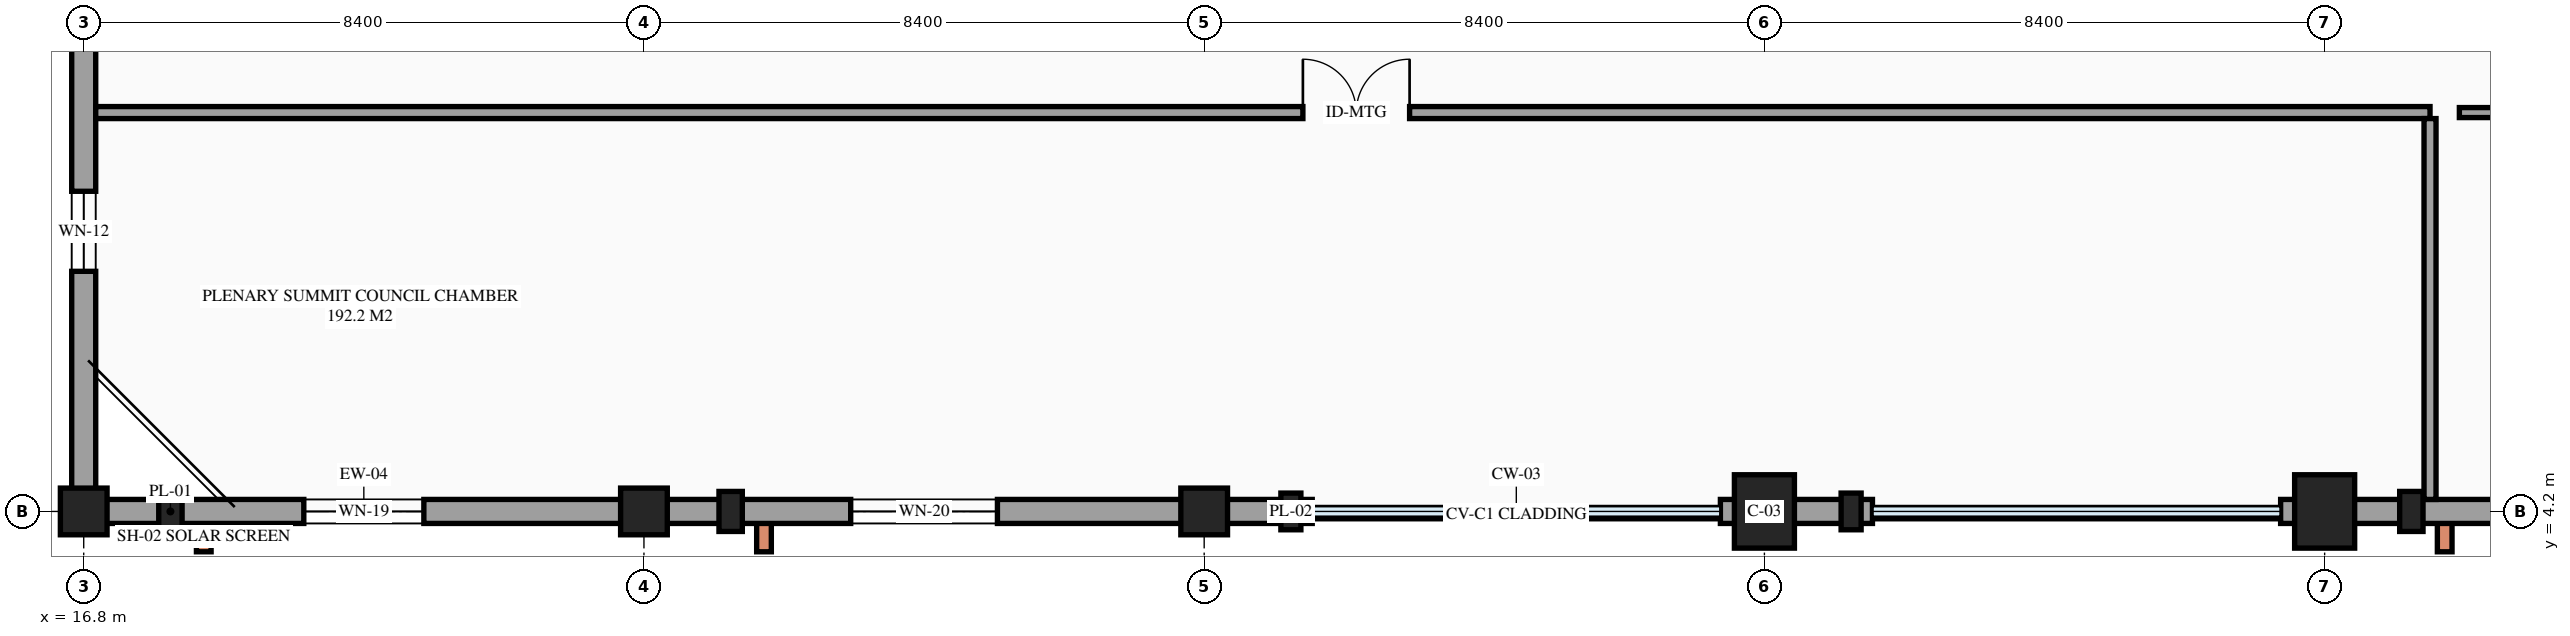
"""IFC4 building model, lengths in metres.
Left out: names, types, materials, properties, quantities, classifications, styles, units other than length and angle.
Written with IfcOpenShell. Run it as: python <this file> out.ifc"""

import sys

from ifc_helpers import new_model, si_unit, direction, frame, frame_2d, origin, origin_2d, place, context, subcontext, project, spatial, rectangle, extrude, element, fill, save


model = new_model("IFC4")
c1 = context("Model", 3, precision=1e-05, world=origin(), true_north=direction((0.0, 1.0)))
c2 = subcontext(c1, "Body", "Model", "MODEL_VIEW")
j1 = project(units=[si_unit("LENGTHUNIT", "METRE"), si_unit("PLANEANGLEUNIT", "RADIAN")], contexts=[c1])
p1 = place(None, origin())
s1 = spatial("IfcSite", under=j1, at=p1, CompositionType="ELEMENT")
p2 = place(p1, origin())
s2 = spatial("IfcBuilding", under=s1, at=p2, CompositionType="ELEMENT")
p3 = place(p2, frame((0.0, 0.0, 14.1)))
s3 = spatial("IfcBuildingStorey", under=s2, at=p3, CompositionType="ELEMENT", Elevation=14.1)
for number, where, z_axis, x_axis in (
    (1, (16.8, 4.2, 0.0), (0.0, 0.0, 1.0), (1.0, 0.0, 0.0)),
    (2, (25.2, 4.2, 0.0), (0.0, 0.0, 1.0), (1.0, 0.0, 0.0)),
    (3, (33.6, 4.2, 0.0), (0.0, 0.0, 1.0), (1.0, 0.0, 0.0)),
):
    element("IfcColumn", number, at=place(p3, frame(where, z_axis=z_axis, x_axis=x_axis)), inside=s3, PredefinedType="COLUMN", context=c2, shape_type="SweptSolid", body=[
        extrude(rectangle(XDim=0.7, YDim=0.7, at=origin_2d()), origin(), (0.0, 0.0, 1.0), 4.2),
    ])
for number, where, z_axis, x_axis in (
    (4, (42.0, 4.2, 0.0), (0.0, 0.0, 1.0), (1.0, 0.0, 0.0)),
    (5, (50.4, 4.2, 0.0), (0.0, 0.0, 1.0), (1.0, 0.0, 0.0)),
):
    element("IfcColumn", number, at=place(p3, frame(where, z_axis=z_axis, x_axis=x_axis)), inside=s3, PredefinedType="COLUMN", context=c2, shape_type="SweptSolid", body=[
        extrude(rectangle(XDim=0.9, YDim=1.1, at=origin_2d()), origin(), (0.0, 0.0, 1.0), 4.2),
    ])
for number, where, z_axis, x_axis in (
    (6, (18.1, 4.2, 0.0), (0.0, 0.0, 1.0), (1.0, 0.0, 0.0)),
    (7, (26.5, 4.2, 0.0), (0.0, 0.0, 1.0), (1.0, 0.0, 0.0)),
):
    element("IfcColumn", number, at=place(p3, frame(where, z_axis=z_axis, x_axis=x_axis)), inside=s3, PredefinedType="PILASTER", context=c2, shape_type="SweptSolid", body=[
        extrude(rectangle(XDim=0.35, YDim=0.6, at=origin_2d()), origin(), (0.0, 0.0, 1.0), 4.2),
    ])
for number, where, z_axis, x_axis in (
    (8, (34.9, 4.2, 0.0), (0.0, 0.0, 1.0), (1.0, 0.0, 0.0)),
    (9, (43.3, 4.2, 0.0), (0.0, 0.0, 1.0), (1.0, 0.0, 0.0)),
):
    element("IfcColumn", number, at=place(p3, frame(where, z_axis=z_axis, x_axis=x_axis)), inside=s3, PredefinedType="PILASTER", context=c2, shape_type="SweptSolid", body=[
        extrude(rectangle(XDim=0.3, YDim=0.55, at=origin_2d()), origin(), (0.0, 0.0, 1.0), 4.2),
    ])
p4 = place(p3, frame((51.7, 4.2, 0.0), z_axis=(0.0, 0.0, 1.0), x_axis=(1.0, 0.0, 0.0)))
e10 = element("IfcColumn", 10, at=p4, inside=s3, PredefinedType="PILASTER", context=c2, shape_type="SweptSolid", body=[
    extrude(rectangle(XDim=0.35, YDim=0.6, at=origin_2d()), origin(), (0.0, 0.0, 1.0), 4.2),
])
p5 = place(p3, frame((16.8, 4.2, 0.0), z_axis=(0.0, 0.0, 1.0), x_axis=(1.0, 0.0, 0.0)))
e11 = element("IfcWall", 11, at=p5, inside=s3, PredefinedType="STANDARD", context=c2, shape_type="SweptSolid", body=[
    extrude(rectangle(XDim=8.4, YDim=0.36, at=frame_2d((4.2, 0.0))), origin(), (0.0, 0.0, 1.0), 3.15),
])
p6 = place(p5, frame((3.3, 0.0, 0.75)))
e12 = element("IfcOpeningElement", 12, at=p6, cuts=e11, PredefinedType="OPENING", context=c2, shape_type="SweptSolid", body=[
    extrude(rectangle(XDim=1.8, YDim=1.1, at=frame_2d((0.9, 0.55))), frame((0.0, 0.19, 0.0), z_axis=(0.0, -1.0, 0.0), x_axis=(1.0, 0.0, 0.0)), (0.0, 0.0, 1.0), 0.38),
])
p7 = place(p3, frame((25.2, 4.2, 0.0), z_axis=(0.0, 0.0, 1.0), x_axis=(1.0, 0.0, 0.0)))
e13 = element("IfcWall", 13, at=p7, inside=s3, PredefinedType="STANDARD", context=c2, shape_type="SweptSolid", body=[
    extrude(rectangle(XDim=8.4, YDim=0.36, at=frame_2d((4.2, 0.0))), origin(), (0.0, 0.0, 1.0), 3.59),
])
p8 = place(p7, frame((3.1, 0.0, 0.75)))
e14 = element("IfcOpeningElement", 14, at=p8, cuts=e13, PredefinedType="OPENING", context=c2, shape_type="SweptSolid", body=[
    extrude(rectangle(XDim=2.2, YDim=1.2, at=frame_2d((1.1, 0.6))), frame((0.0, 0.19, 0.0), z_axis=(0.0, -1.0, 0.0), x_axis=(1.0, 0.0, 0.0)), (0.0, 0.0, 1.0), 0.38),
])
p9 = place(p3, frame((33.6, 4.2, 0.0), z_axis=(0.0, 0.0, 1.0), x_axis=(1.0, 0.0, 0.0)))
e15 = element("IfcWall", 15, at=p9, inside=s3, PredefinedType="STANDARD", context=c2, shape_type="SweptSolid", body=[
    extrude(rectangle(XDim=1.62, YDim=0.36, at=frame_2d((0.81, 0.0))), origin(), (0.0, 0.0, 1.0), 3.25),
])
p10 = place(p3, frame((41.34, 4.2, 0.0), z_axis=(0.0, 0.0, 1.0), x_axis=(1.0, 0.0, 0.0)))
e16 = element("IfcWall", 16, at=p10, inside=s3, PredefinedType="STANDARD", context=c2, shape_type="SweptSolid", body=[
    extrude(rectangle(XDim=0.66, YDim=0.36, at=frame_2d((0.33, 0.0))), origin(), (0.0, 0.0, 1.0), 4.2),
])
p11 = place(p3, frame((42.0, 4.2, 0.0), z_axis=(0.0, 0.0, 1.0), x_axis=(1.0, 0.0, 0.0)))
e17 = element("IfcWall", 17, at=p11, inside=s3, PredefinedType="STANDARD", context=c2, shape_type="SweptSolid", body=[
    extrude(rectangle(XDim=1.62, YDim=0.36, at=frame_2d((0.81, 0.0))), origin(), (0.0, 0.0, 1.0), 3.2),
])
p12 = place(p3, frame((49.74, 4.2, 0.0), z_axis=(0.0, 0.0, 1.0), x_axis=(1.0, 0.0, 0.0)))
e18 = element("IfcWall", 18, at=p12, inside=s3, PredefinedType="STANDARD", context=c2, shape_type="SweptSolid", body=[
    extrude(rectangle(XDim=0.66, YDim=0.36, at=frame_2d((0.33, 0.0))), origin(), (0.0, 0.0, 1.0), 4.2),
])
p13 = place(p3, frame((50.4, 4.2, 0.0), z_axis=(0.0, 0.0, 1.0), x_axis=(1.0, 0.0, 0.0)))
e19 = element("IfcWall", 19, at=p13, inside=s3, PredefinedType="STANDARD", context=c2, shape_type="SweptSolid", body=[
    extrude(rectangle(XDim=8.4, YDim=0.36, at=frame_2d((4.2, 0.0))), origin(), (0.0, 0.0, 1.0), 4.2),
])
p14 = place(p13, frame((3.6, 0.0, 0.75)))
e20 = element("IfcOpeningElement", 20, at=p14, cuts=e19, PredefinedType="OPENING", context=c2, shape_type="SweptSolid", body=[
    extrude(rectangle(XDim=1.2, YDim=1.5, at=frame_2d((0.6, 0.75))), frame((0.0, 0.19, 0.0), z_axis=(0.0, -1.0, 0.0), x_axis=(1.0, 0.0, 0.0)), (0.0, 0.0, 1.0), 0.38),
])
p15 = place(p3, frame((16.8, 12.6, 0.0), z_axis=(0.0, 0.0, 1.0), x_axis=(0.0, -1.0, 0.0)))
e21 = element("IfcWall", 21, at=p15, inside=s3, PredefinedType="STANDARD", context=c2, shape_type="SweptSolid", body=[
    extrude(rectangle(XDim=8.4, YDim=0.36, at=frame_2d((4.2, 0.0))), origin(), (0.0, 0.0, 1.0), 3.1),
])
p16 = place(p15, frame((3.6, 0.0, 0.8)))
e22 = element("IfcOpeningElement", 22, at=p16, cuts=e21, PredefinedType="OPENING", context=c2, shape_type="SweptSolid", body=[
    extrude(rectangle(XDim=1.2, YDim=1.5, at=frame_2d((0.6, 0.75))), frame((0.0, 0.19, 0.0), z_axis=(0.0, -1.0, 0.0), x_axis=(1.0, 0.0, 0.0)), (0.0, 0.0, 1.0), 0.38),
])
p17 = place(p3, frame((16.98, 10.18, 0.0), z_axis=(0.0, 0.0, 1.0), x_axis=(1.0, 0.0, 0.0)))
e23 = element("IfcWall", 23, at=p17, inside=s3, PredefinedType="PARTITIONING", context=c2, shape_type="SweptSolid", body=[
    extrude(rectangle(XDim=35.0, YDim=0.18, at=frame_2d((17.5, 0.0))), origin(), (0.0, 0.0, 1.0), 3.895),
])
p18 = place(p17, frame((18.1, 0.0, 0.0)))
e24 = element("IfcOpeningElement", 24, at=p18, cuts=e23, PredefinedType="OPENING", context=c2, shape_type="SweptSolid", body=[
    extrude(rectangle(XDim=1.6, YDim=2.25, at=frame_2d((0.8, 1.125))), frame((0.0, 0.1, 0.0), z_axis=(0.0, -1.0, 0.0), x_axis=(1.0, 0.0, 0.0)), (0.0, 0.0, 1.0), 0.2),
])
p19 = place(p3, frame((51.98, 4.38, 0.0), z_axis=(0.0, 0.0, 1.0), x_axis=(0.0, 1.0, 0.0)))
e25 = element("IfcWall", 25, at=p19, inside=s3, PredefinedType="PARTITIONING", context=c2, shape_type="SweptSolid", body=[
    extrude(rectangle(XDim=5.71, YDim=0.18, at=frame_2d((2.855, 0.0))), origin(), (0.0, 0.0, 1.0), 3.895),
])
p20 = place(p3, frame((52.42, 10.18, 0.0), z_axis=(0.0, 0.0, 1.0), x_axis=(1.0, 0.0, 0.0)))
e26 = element("IfcWall", 26, at=p20, inside=s3, PredefinedType="PARTITIONING", context=c2, shape_type="SweptSolid", body=[
    extrude(rectangle(XDim=25.56, YDim=0.15, at=frame_2d((12.78, 0.0))), origin(), (0.0, 0.0, 1.0), 3.895),
])
p21 = place(p20, frame((11.63, 0.0, 0.0)))
e27 = element("IfcOpeningElement", 27, at=p21, cuts=e26, PredefinedType="OPENING", context=c2, shape_type="SweptSolid", body=[
    extrude(rectangle(XDim=1.6, YDim=2.25, at=frame_2d((0.8, 1.125))), frame((0.0, 0.085, 0.0), z_axis=(0.0, -1.0, 0.0), x_axis=(1.0, 0.0, 0.0)), (0.0, 0.0, 1.0), 0.17),
])
p22 = place(p6, origin())
e28 = element("IfcWindow", 28, at=p22, inside=s3, PartitioningType="SINGLE_PANEL", PredefinedType="WINDOW", context=c2, shape_type="SweptSolid", body=[
    extrude(rectangle(XDim=1.8, YDim=1.1, at=frame_2d((0.9, 0.55))), frame((0.0, 0.03, 0.0), z_axis=(0.0, -1.0, 0.0), x_axis=(1.0, 0.0, 0.0)), (0.0, 0.0, 1.0), 0.06),
])
fill(e12, e28)
p23 = place(p8, origin())
e29 = element("IfcWindow", 29, at=p23, inside=s3, PartitioningType="SINGLE_PANEL", PredefinedType="WINDOW", context=c2, shape_type="SweptSolid", body=[
    extrude(rectangle(XDim=2.2, YDim=1.2, at=frame_2d((1.1, 0.6))), frame((0.0, 0.03, 0.0), z_axis=(0.0, -1.0, 0.0), x_axis=(1.0, 0.0, 0.0)), (0.0, 0.0, 1.0), 0.06),
])
fill(e14, e29)
p24 = place(p16, origin())
e30 = element("IfcWindow", 30, at=p24, inside=s3, PartitioningType="SINGLE_PANEL", PredefinedType="WINDOW", context=c2, shape_type="SweptSolid", body=[
    extrude(rectangle(XDim=1.2, YDim=1.5, at=frame_2d((0.6, 0.75))), frame((0.0, 0.03, 0.0), z_axis=(0.0, -1.0, 0.0), x_axis=(1.0, 0.0, 0.0)), (0.0, 0.0, 1.0), 0.06),
])
fill(e22, e30)
p25 = place(p18, origin())
e31 = element("IfcDoor", 31, at=p25, inside=s3, OperationType="DOUBLE_DOOR_SINGLE_SWING", PredefinedType="DOOR", context=c2, shape_type="SweptSolid", body=[
    extrude(rectangle(XDim=1.6, YDim=2.25, at=frame_2d((0.8, 1.125))), frame((0.0, 0.025, 0.0), z_axis=(0.0, -1.0, 0.0), x_axis=(1.0, 0.0, 0.0)), (0.0, 0.0, 1.0), 0.05),
])
fill(e24, e31)
save(model, sys.argv[1])
